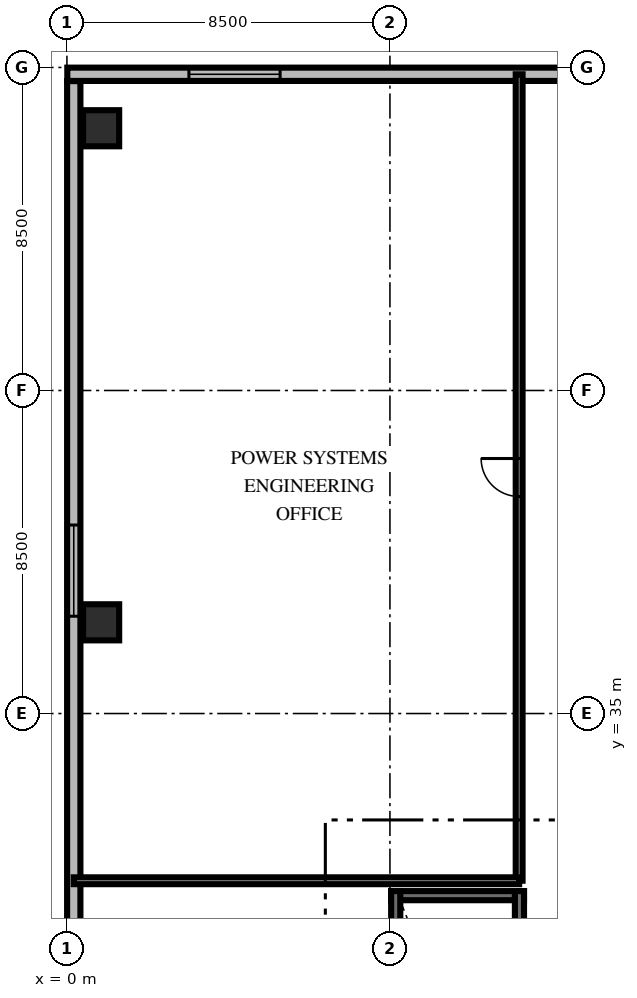
"""IFC4 building model, lengths in metres.
Left out: names, types, materials, properties, quantities, classifications, styles, units other than length and angle.
Written with IfcOpenShell. Run it as: python <this file> out.ifc"""

import sys

from ifc_helpers import new_model, si_unit, direction, frame, frame_2d, origin, origin_2d, place, context, subcontext, project, spatial, rectangle, extrude, element, fill, save


model = new_model("IFC4")
c1 = context("Model", 3, precision=1e-05, world=origin(), true_north=direction((0.0, 1.0)))
c2 = subcontext(c1, "Body", "Model", "MODEL_VIEW")
j1 = project(units=[si_unit("LENGTHUNIT", "METRE"), si_unit("PLANEANGLEUNIT", "RADIAN")], contexts=[c1])
p1 = place(None, origin())
s1 = spatial("IfcSite", under=j1, at=p1, CompositionType="ELEMENT")
p2 = place(p1, origin())
s2 = spatial("IfcBuilding", under=s1, at=p2, CompositionType="ELEMENT")
p3 = place(p2, frame((0.0, 0.0, 15.6)))
s3 = spatial("IfcBuildingStorey", under=s2, at=p3, CompositionType="ELEMENT", Elevation=15.6)
p4 = place(p3, frame((8.532, 30.208, 0.0), z_axis=(0.0, 0.0, 1.0), x_axis=(1.0, 0.0, 0.0)))
e1 = element("IfcWall", 1, at=p4, inside=s3, PredefinedType="SHEAR", context=c2, shape_type="SweptSolid", body=[
    extrude(rectangle(XDim=3.496, YDim=0.24, at=frame_2d((1.748, 0.0))), origin(), (0.0, 0.0, 1.0), 4.8),
])
p5 = place(p3, frame((8.652, 20.772, 0.0), z_axis=(0.0, 0.0, 1.0), x_axis=(0.0, 1.0, 0.0)))
e2 = element("IfcWall", 2, at=p5, inside=s3, PredefinedType="SHEAR", context=c2, shape_type="SweptSolid", body=[
    extrude(rectangle(XDim=9.556, YDim=0.24, at=frame_2d((4.778, 0.0))), origin(), (0.0, 0.0, 1.0), 4.8),
])
p6 = place(p3, frame((11.908, 20.772, 0.0), z_axis=(0.0, 0.0, 1.0), x_axis=(0.0, 1.0, 0.0)))
e3 = element("IfcWall", 3, at=p6, inside=s3, PredefinedType="SHEAR", context=c2, shape_type="SweptSolid", body=[
    extrude(rectangle(XDim=9.556, YDim=0.24, at=frame_2d((4.778, 0.0))), origin(), (0.0, 0.0, 1.0), 4.8),
])
p7 = place(p6, frame((0.55, 0.0, 0.0)))
e4 = element("IfcOpeningElement", 4, at=p7, cuts=e3, PredefinedType="OPENING", context=c2, shape_type="SweptSolid", body=[
    extrude(rectangle(XDim=1.05, YDim=2.15, at=frame_2d((0.525, 1.075))), frame((0.0, 0.13, 0.0), z_axis=(0.0, -1.0, 0.0), x_axis=(1.0, 0.0, 0.0)), (0.0, 0.0, 1.0), 0.26),
])
for number, where, z_axis, x_axis in (
    (5, (0.9, 37.4, 0.0), (0.0, 0.0, 1.0), (1.0, 0.0, 0.0)),
    (6, (0.9, 50.4, 0.0), (0.0, 0.0, 1.0), (1.0, 0.0, 0.0)),
):
    element("IfcColumn", number, at=place(p3, frame(where, z_axis=z_axis, x_axis=x_axis)), inside=s3, PredefinedType="COLUMN", context=c2, shape_type="SweptSolid", body=[
        extrude(rectangle(XDim=0.95, YDim=0.95, at=origin_2d()), origin(), (0.0, 0.0, 1.0), 4.8),
    ])
p8 = place(p3, frame((0.18, 0.36, 0.0), z_axis=(0.0, 0.0, 1.0), x_axis=(0.0, 1.0, 0.0)))
e7 = element("IfcWall", 7, at=p8, inside=s3, PredefinedType="SOLIDWALL", context=c2, shape_type="SweptSolid", body=[
    extrude(rectangle(XDim=51.28, YDim=0.35, at=frame_2d((25.64, 0.0))), origin(), (0.0, 0.0, 1.0), 3.76),
])
p9 = place(p8, frame((3.2, 0.0, 0.85)))
e8 = element("IfcOpeningElement", 8, at=p9, cuts=e7, PredefinedType="OPENING", context=c2, shape_type="SweptSolid", body=[
    extrude(rectangle(XDim=2.4, YDim=2.4, at=frame_2d((1.2, 1.2))), frame((0.0, 0.185, 0.0), z_axis=(0.0, -1.0, 0.0), x_axis=(1.0, 0.0, 0.0)), (0.0, 0.0, 1.0), 0.37),
])
p10 = place(p8, frame((11.7, 0.0, 0.85)))
e9 = element("IfcOpeningElement", 9, at=p10, cuts=e7, PredefinedType="OPENING", context=c2, shape_type="SweptSolid", body=[
    extrude(rectangle(XDim=2.4, YDim=2.4, at=frame_2d((1.2, 1.2))), frame((0.0, 0.185, 0.0), z_axis=(0.0, -1.0, 0.0), x_axis=(1.0, 0.0, 0.0)), (0.0, 0.0, 1.0), 0.37),
])
p11 = place(p8, frame((22.05, 0.0, 0.85)))
e10 = element("IfcOpeningElement", 10, at=p11, cuts=e7, PredefinedType="OPENING", context=c2, shape_type="SweptSolid", body=[
    extrude(rectangle(XDim=2.4, YDim=2.4, at=frame_2d((1.2, 1.2))), frame((0.0, 0.185, 0.0), z_axis=(0.0, -1.0, 0.0), x_axis=(1.0, 0.0, 0.0)), (0.0, 0.0, 1.0), 0.37),
])
p12 = place(p8, frame((37.2, 0.0, 0.85)))
e11 = element("IfcOpeningElement", 11, at=p12, cuts=e7, PredefinedType="OPENING", context=c2, shape_type="SweptSolid", body=[
    extrude(rectangle(XDim=2.4, YDim=2.4, at=frame_2d((1.2, 1.2))), frame((0.0, 0.185, 0.0), z_axis=(0.0, -1.0, 0.0), x_axis=(1.0, 0.0, 0.0)), (0.0, 0.0, 1.0), 0.37),
])
p13 = place(p3, frame((0.01, 51.82, 0.0), z_axis=(0.0, 0.0, 1.0), x_axis=(1.0, 0.0, 0.0)))
e12 = element("IfcWall", 12, at=p13, inside=s3, PredefinedType="SOLIDWALL", context=c2, shape_type="SweptSolid", body=[
    extrude(rectangle(XDim=25.42, YDim=0.35, at=frame_2d((12.71, 0.0))), origin(), (0.0, 0.0, 1.0), 3.76),
])
p14 = place(p13, frame((3.2, 0.0, 0.85)))
e13 = element("IfcOpeningElement", 13, at=p14, cuts=e12, PredefinedType="OPENING", context=c2, shape_type="SweptSolid", body=[
    extrude(rectangle(XDim=2.4, YDim=2.4, at=frame_2d((1.2, 1.2))), frame((0.0, 0.185, 0.0), z_axis=(0.0, -1.0, 0.0), x_axis=(1.0, 0.0, 0.0)), (0.0, 0.0, 1.0), 0.37),
])
p15 = place(p3, frame((11.9, 30.6, 0.0), z_axis=(0.0, 0.0, 1.0), x_axis=(0.0, 1.0, 0.0)))
e14 = element("IfcWall", 14, at=p15, inside=s3, PredefinedType="PARTITIONING", context=c2, shape_type="SweptSolid", body=[
    extrude(rectangle(XDim=21.22, YDim=0.18, at=frame_2d((10.61, 0.0))), origin(), (0.0, 0.0, 1.0), 2.61),
])
p16 = place(p15, frame((10.11, 0.0, 0.0)))
e15 = element("IfcOpeningElement", 15, at=p16, cuts=e14, PredefinedType="OPENING", context=c2, shape_type="SweptSolid", body=[
    extrude(rectangle(XDim=1.0, YDim=2.15, at=frame_2d((0.5, 1.075))), frame((0.0, 0.1, 0.0), z_axis=(0.0, -1.0, 0.0), x_axis=(1.0, 0.0, 0.0)), (0.0, 0.0, 1.0), 0.2),
])
p17 = place(p3, frame((0.18, 30.6, 0.0), z_axis=(0.0, 0.0, 1.0), x_axis=(1.0, 0.0, 0.0)))
e16 = element("IfcWall", 16, at=p17, inside=s3, PredefinedType="PARTITIONING", context=c2, shape_type="SweptSolid", body=[
    extrude(rectangle(XDim=11.72, YDim=0.18, at=frame_2d((5.86, 0.0))), origin(), (0.0, 0.0, 1.0), 2.61),
])
p18 = place(p12, origin())
e17 = element("IfcWindow", 17, at=p18, inside=s3, PartitioningType="SINGLE_PANEL", PredefinedType="WINDOW", context=c2, shape_type="SweptSolid", body=[
    extrude(rectangle(XDim=2.4, YDim=2.4, at=frame_2d((1.2, 1.2))), frame((0.0, 0.03, 0.0), z_axis=(0.0, -1.0, 0.0), x_axis=(1.0, 0.0, 0.0)), (0.0, 0.0, 1.0), 0.06),
])
fill(e11, e17)
p19 = place(p14, origin())
e18 = element("IfcWindow", 18, at=p19, inside=s3, PartitioningType="SINGLE_PANEL", PredefinedType="WINDOW", context=c2, shape_type="SweptSolid", body=[
    extrude(rectangle(XDim=2.4, YDim=2.4, at=frame_2d((1.2, 1.2))), frame((0.0, 0.03, 0.0), z_axis=(0.0, -1.0, 0.0), x_axis=(1.0, 0.0, 0.0)), (0.0, 0.0, 1.0), 0.06),
])
fill(e13, e18)
p20 = place(p16, origin())
e19 = element("IfcDoor", 19, at=p20, inside=s3, OperationType="SINGLE_SWING_RIGHT", PredefinedType="DOOR", context=c2, shape_type="SweptSolid", body=[
    extrude(rectangle(XDim=1.0, YDim=2.15, at=frame_2d((0.5, 1.075))), frame((0.0, 0.025, 0.0), z_axis=(0.0, -1.0, 0.0), x_axis=(1.0, 0.0, 0.0)), (0.0, 0.0, 1.0), 0.05),
])
fill(e15, e19)
save(model, sys.argv[1])
